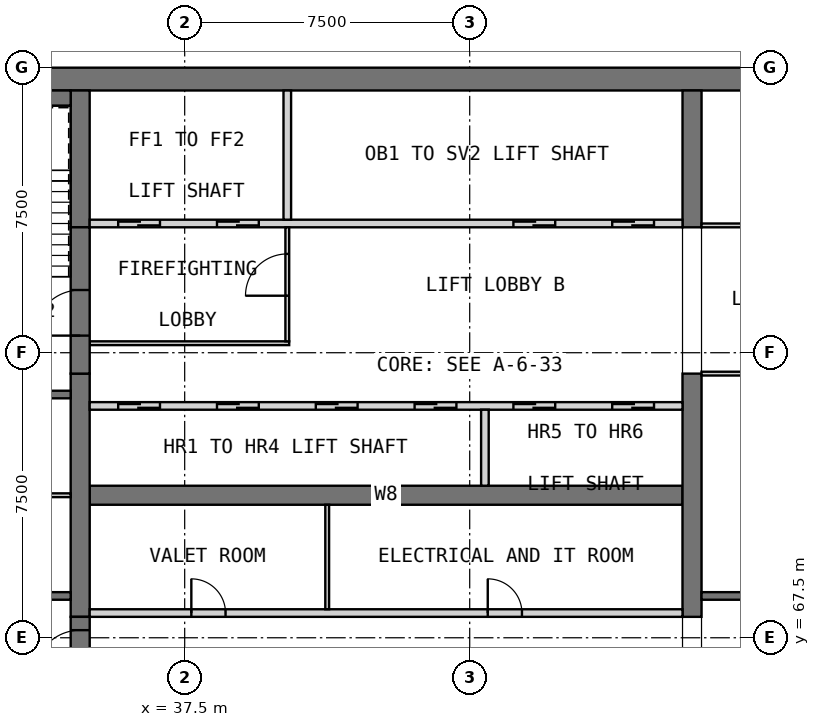
"""IFC4 building model, lengths in metres.
Left out: names, types, materials, properties, quantities, classifications, styles, units other than length and angle.
Written with IfcOpenShell. Run it as: python <this file> out.ifc"""

import sys

from ifc_helpers import new_model, si_unit, direction, frame, frame_2d, origin, place, context, subcontext, project, spatial, rectangle, extrude, element, fill, save


model = new_model("IFC4")
c1 = context("Model", 3, precision=1e-05, world=origin(), true_north=direction((0.0, 1.0)))
c2 = subcontext(c1, "Body", "Model", "MODEL_VIEW")
j1 = project(units=[si_unit("LENGTHUNIT", "METRE"), si_unit("PLANEANGLEUNIT", "RADIAN")], contexts=[c1])
p1 = place(None, origin())
s1 = spatial("IfcSite", under=j1, at=p1, CompositionType="ELEMENT")
p2 = place(p1, origin())
s2 = spatial("IfcBuilding", under=s1, at=p2, CompositionType="ELEMENT")
p3 = place(p2, frame((0.0, 0.0, 230.2)))
s3 = spatial("IfcBuildingStorey", under=s2, at=p3, CompositionType="ELEMENT", Elevation=230.2)
p4 = place(p3, frame((30.0, 82.2, 0.0), z_axis=(0.0, 0.0, 1.0), x_axis=(1.0, 0.0, 0.0)))
e1 = element("IfcWall", 1, at=p4, inside=s3, PredefinedType="SHEAR", context=c2, shape_type="SweptSolid", body=[
    extrude(rectangle(XDim=30.0, YDim=0.6, at=frame_2d((15.0, 0.0))), origin(), (0.0, 0.0, 1.0), 3.5),
])
p5 = place(p3, frame((35.0, 71.25, 0.0), z_axis=(0.0, 0.0, 1.0), x_axis=(1.0, 0.0, 0.0)))
e2 = element("IfcWall", 2, at=p5, inside=s3, PredefinedType="SHEAR", context=c2, shape_type="SweptSolid", body=[
    extrude(rectangle(XDim=15.6, YDim=0.5, at=frame_2d((7.8, 0.0))), origin(), (0.0, 0.0, 1.0), 3.5),
])
p6 = place(p3, frame((34.75, 68.05, 0.0), z_axis=(0.0, 0.0, 1.0), x_axis=(0.0, 1.0, 0.0)))
e3 = element("IfcWall", 3, at=p6, inside=s3, PredefinedType="SHEAR", context=c2, shape_type="SweptSolid", body=[
    extrude(rectangle(XDim=6.4, YDim=0.5, at=frame_2d((3.2, 0.0))), origin(), (0.0, 0.0, 1.0), 3.5),
])
p7 = place(p3, frame((34.75, 78.3, 0.0), z_axis=(0.0, 0.0, 1.0), x_axis=(0.0, 1.0, 0.0)))
e4 = element("IfcWall", 4, at=p7, inside=s3, PredefinedType="SHEAR", context=c2, shape_type="SweptSolid", body=[
    extrude(rectangle(XDim=3.6, YDim=0.5, at=frame_2d((1.8, 0.0))), origin(), (0.0, 0.0, 1.0), 3.5),
])
p8 = place(p3, frame((50.85, 68.05, 0.0), z_axis=(0.0, 0.0, 1.0), x_axis=(0.0, 1.0, 0.0)))
e5 = element("IfcWall", 5, at=p8, inside=s3, PredefinedType="SHEAR", context=c2, shape_type="SweptSolid", body=[
    extrude(rectangle(XDim=6.4, YDim=0.5, at=frame_2d((3.2, 0.0))), origin(), (0.0, 0.0, 1.0), 3.5),
])
p9 = place(p3, frame((50.85, 78.3, 0.0), z_axis=(0.0, 0.0, 1.0), x_axis=(0.0, 1.0, 0.0)))
e6 = element("IfcWall", 6, at=p9, inside=s3, PredefinedType="SHEAR", context=c2, shape_type="SweptSolid", body=[
    extrude(rectangle(XDim=3.6, YDim=0.5, at=frame_2d((1.8, 0.0))), origin(), (0.0, 0.0, 1.0), 3.5),
])
p10 = place(p3, frame((35.0, 68.15, 0.0), z_axis=(0.0, 0.0, 1.0), x_axis=(1.0, 0.0, 0.0)))
e7 = element("IfcWall", 7, at=p10, inside=s3, PredefinedType="PARTITIONING", context=c2, shape_type="SweptSolid", body=[
    extrude(rectangle(XDim=15.6, YDim=0.2, at=frame_2d((7.8, 0.0))), origin(), (0.0, 0.0, 1.0), 3.25),
])
p11 = place(p10, frame((2.675, 0.0, 0.0)))
e8 = element("IfcOpeningElement", 8, at=p11, cuts=e7, PredefinedType="OPENING", context=c2, shape_type="SweptSolid", body=[
    extrude(rectangle(XDim=0.9, YDim=2.1, at=frame_2d((0.45, 1.05))), frame((0.0, 0.11, 0.0), z_axis=(0.0, -1.0, 0.0), x_axis=(1.0, 0.0, 0.0)), (0.0, 0.0, 1.0), 0.22),
])
p12 = place(p10, frame((10.475, 0.0, 0.0)))
e9 = element("IfcOpeningElement", 9, at=p12, cuts=e7, PredefinedType="OPENING", context=c2, shape_type="SweptSolid", body=[
    extrude(rectangle(XDim=0.9, YDim=2.1, at=frame_2d((0.45, 1.05))), frame((0.0, 0.11, 0.0), z_axis=(0.0, -1.0, 0.0), x_axis=(1.0, 0.0, 0.0)), (0.0, 0.0, 1.0), 0.22),
])
p13 = place(p3, frame((41.25, 68.25, 0.0), z_axis=(0.0, 0.0, 1.0), x_axis=(0.0, 1.0, 0.0)))
e10 = element("IfcWall", 10, at=p13, inside=s3, PredefinedType="PARTITIONING", context=c2, shape_type="SweptSolid", body=[
    extrude(rectangle(XDim=2.75, YDim=0.1, at=frame_2d((1.375, 0.0))), origin(), (0.0, 0.0, 1.0), 3.25),
])
p14 = place(p3, frame((35.0, 73.6, 0.0), z_axis=(0.0, 0.0, 1.0), x_axis=(1.0, 0.0, 0.0)))
e11 = element("IfcWall", 11, at=p14, inside=s3, PredefinedType="SOLIDWALL", context=c2, shape_type="SweptSolid", body=[
    extrude(rectangle(XDim=15.6, YDim=0.2, at=frame_2d((7.8, 0.0))), origin(), (0.0, 0.0, 1.0), 3.5),
])
p15 = place(p14, frame((0.75, 0.0, 0.0)))
e12 = element("IfcOpeningElement", 12, at=p15, cuts=e11, PredefinedType="OPENING", context=c2, shape_type="SweptSolid", body=[
    extrude(rectangle(XDim=1.1, YDim=2.1, at=frame_2d((0.55, 1.05))), frame((0.0, 0.11, 0.0), z_axis=(0.0, -1.0, 0.0), x_axis=(1.0, 0.0, 0.0)), (0.0, 0.0, 1.0), 0.22),
])
p16 = place(p14, frame((3.35, 0.0, 0.0)))
e13 = element("IfcOpeningElement", 13, at=p16, cuts=e11, PredefinedType="OPENING", context=c2, shape_type="SweptSolid", body=[
    extrude(rectangle(XDim=1.1, YDim=2.1, at=frame_2d((0.55, 1.05))), frame((0.0, 0.11, 0.0), z_axis=(0.0, -1.0, 0.0), x_axis=(1.0, 0.0, 0.0)), (0.0, 0.0, 1.0), 0.22),
])
p17 = place(p14, frame((5.95, 0.0, 0.0)))
e14 = element("IfcOpeningElement", 14, at=p17, cuts=e11, PredefinedType="OPENING", context=c2, shape_type="SweptSolid", body=[
    extrude(rectangle(XDim=1.1, YDim=2.1, at=frame_2d((0.55, 1.05))), frame((0.0, 0.11, 0.0), z_axis=(0.0, -1.0, 0.0), x_axis=(1.0, 0.0, 0.0)), (0.0, 0.0, 1.0), 0.22),
])
p18 = place(p14, frame((8.55, 0.0, 0.0)))
e15 = element("IfcOpeningElement", 15, at=p18, cuts=e11, PredefinedType="OPENING", context=c2, shape_type="SweptSolid", body=[
    extrude(rectangle(XDim=1.1, YDim=2.1, at=frame_2d((0.55, 1.05))), frame((0.0, 0.11, 0.0), z_axis=(0.0, -1.0, 0.0), x_axis=(1.0, 0.0, 0.0)), (0.0, 0.0, 1.0), 0.22),
])
p19 = place(p14, frame((11.15, 0.0, 0.0)))
e16 = element("IfcOpeningElement", 16, at=p19, cuts=e11, PredefinedType="OPENING", context=c2, shape_type="SweptSolid", body=[
    extrude(rectangle(XDim=1.1, YDim=2.1, at=frame_2d((0.55, 1.05))), frame((0.0, 0.11, 0.0), z_axis=(0.0, -1.0, 0.0), x_axis=(1.0, 0.0, 0.0)), (0.0, 0.0, 1.0), 0.22),
])
p20 = place(p14, frame((13.75, 0.0, 0.0)))
e17 = element("IfcOpeningElement", 17, at=p20, cuts=e11, PredefinedType="OPENING", context=c2, shape_type="SweptSolid", body=[
    extrude(rectangle(XDim=1.1, YDim=2.1, at=frame_2d((0.55, 1.05))), frame((0.0, 0.11, 0.0), z_axis=(0.0, -1.0, 0.0), x_axis=(1.0, 0.0, 0.0)), (0.0, 0.0, 1.0), 0.22),
])
p21 = place(p3, frame((45.4, 71.5, 0.0), z_axis=(0.0, 0.0, 1.0), x_axis=(0.0, 1.0, 0.0)))
e18 = element("IfcWall", 18, at=p21, inside=s3, PredefinedType="SOLIDWALL", context=c2, shape_type="SweptSolid", body=[
    extrude(rectangle(XDim=2.0, YDim=0.2, at=frame_2d((1.0, 0.0))), origin(), (0.0, 0.0, 1.0), 3.5),
])
p22 = place(p3, frame((35.0, 78.4, 0.0), z_axis=(0.0, 0.0, 1.0), x_axis=(1.0, 0.0, 0.0)))
e19 = element("IfcWall", 19, at=p22, inside=s3, PredefinedType="SOLIDWALL", context=c2, shape_type="SweptSolid", body=[
    extrude(rectangle(XDim=15.6, YDim=0.2, at=frame_2d((7.8, 0.0))), origin(), (0.0, 0.0, 1.0), 3.5),
])
p23 = place(p22, frame((0.75, 0.0, 0.0)))
e20 = element("IfcOpeningElement", 20, at=p23, cuts=e19, PredefinedType="OPENING", context=c2, shape_type="SweptSolid", body=[
    extrude(rectangle(XDim=1.1, YDim=2.1, at=frame_2d((0.55, 1.05))), frame((0.0, 0.11, 0.0), z_axis=(0.0, -1.0, 0.0), x_axis=(1.0, 0.0, 0.0)), (0.0, 0.0, 1.0), 0.22),
])
p24 = place(p22, frame((3.35, 0.0, 0.0)))
e21 = element("IfcOpeningElement", 21, at=p24, cuts=e19, PredefinedType="OPENING", context=c2, shape_type="SweptSolid", body=[
    extrude(rectangle(XDim=1.1, YDim=2.1, at=frame_2d((0.55, 1.05))), frame((0.0, 0.11, 0.0), z_axis=(0.0, -1.0, 0.0), x_axis=(1.0, 0.0, 0.0)), (0.0, 0.0, 1.0), 0.22),
])
p25 = place(p22, frame((11.15, 0.0, 0.0)))
e22 = element("IfcOpeningElement", 22, at=p25, cuts=e19, PredefinedType="OPENING", context=c2, shape_type="SweptSolid", body=[
    extrude(rectangle(XDim=1.1, YDim=2.1, at=frame_2d((0.55, 1.05))), frame((0.0, 0.11, 0.0), z_axis=(0.0, -1.0, 0.0), x_axis=(1.0, 0.0, 0.0)), (0.0, 0.0, 1.0), 0.22),
])
p26 = place(p22, frame((13.75, 0.0, 0.0)))
e23 = element("IfcOpeningElement", 23, at=p26, cuts=e19, PredefinedType="OPENING", context=c2, shape_type="SweptSolid", body=[
    extrude(rectangle(XDim=1.1, YDim=2.1, at=frame_2d((0.55, 1.05))), frame((0.0, 0.11, 0.0), z_axis=(0.0, -1.0, 0.0), x_axis=(1.0, 0.0, 0.0)), (0.0, 0.0, 1.0), 0.22),
])
p27 = place(p3, frame((40.2, 78.5, 0.0), z_axis=(0.0, 0.0, 1.0), x_axis=(0.0, 1.0, 0.0)))
e24 = element("IfcWall", 24, at=p27, inside=s3, PredefinedType="SOLIDWALL", context=c2, shape_type="SweptSolid", body=[
    extrude(rectangle(XDim=3.4, YDim=0.2, at=frame_2d((1.7, 0.0))), origin(), (0.0, 0.0, 1.0), 3.5),
])
p28 = place(p3, frame((35.0, 75.25, 0.0), z_axis=(0.0, 0.0, 1.0), x_axis=(1.0, 0.0, 0.0)))
e25 = element("IfcWall", 25, at=p28, inside=s3, PredefinedType="PARTITIONING", context=c2, shape_type="SweptSolid", body=[
    extrude(rectangle(XDim=5.25, YDim=0.1, at=frame_2d((2.625, 0.0))), origin(), (0.0, 0.0, 1.0), 3.25),
])
p29 = place(p3, frame((40.2, 75.3, 0.0), z_axis=(0.0, 0.0, 1.0), x_axis=(0.0, 1.0, 0.0)))
e26 = element("IfcWall", 26, at=p29, inside=s3, PredefinedType="PARTITIONING", context=c2, shape_type="SweptSolid", body=[
    extrude(rectangle(XDim=3.0, YDim=0.1, at=frame_2d((1.5, 0.0))), origin(), (0.0, 0.0, 1.0), 3.25),
])
p30 = place(p29, frame((1.2, 0.0, 0.0)))
e27 = element("IfcOpeningElement", 27, at=p30, cuts=e26, PredefinedType="OPENING", context=c2, shape_type="SweptSolid", body=[
    extrude(rectangle(XDim=1.1, YDim=2.1, at=frame_2d((0.55, 1.05))), frame((0.0, 0.06, 0.0), z_axis=(0.0, -1.0, 0.0), x_axis=(1.0, 0.0, 0.0)), (0.0, 0.0, 1.0), 0.12),
])
p31 = place(p3, frame((34.75, 64.2, 0.0), z_axis=(0.0, 0.0, 1.0), x_axis=(0.0, 1.0, 0.0)))
e28 = element("IfcWall", 28, at=p31, inside=s3, PredefinedType="SOLIDWALL", context=c2, shape_type="SweptSolid", body=[
    extrude(rectangle(XDim=3.85, YDim=0.5, at=frame_2d((1.925, 0.0))), origin(), (0.0, 0.0, 1.0), 2.3),
])
p32 = place(p31, frame((2.3, 0.0, 0.0)))
e29 = element("IfcOpeningElement", 29, at=p32, cuts=e28, PredefinedType="OPENING", context=c2, shape_type="SweptSolid", body=[
    extrude(rectangle(XDim=1.2, YDim=2.1, at=frame_2d((0.6, 1.05))), frame((0.0, 0.26, 0.0), z_axis=(0.0, -1.0, 0.0), x_axis=(1.0, 0.0, 0.0)), (0.0, 0.0, 1.0), 0.52),
])
p33 = place(p3, frame((34.75, 74.45, 0.0), z_axis=(0.0, 0.0, 1.0), x_axis=(0.0, 1.0, 0.0)))
e30 = element("IfcWall", 30, at=p33, inside=s3, PredefinedType="SOLIDWALL", context=c2, shape_type="SweptSolid", body=[
    extrude(rectangle(XDim=3.85, YDim=0.5, at=frame_2d((1.925, 0.0))), origin(), (0.0, 0.0, 1.0), 2.3),
])
p34 = place(p33, frame((1.0, 0.0, 0.0)))
e31 = element("IfcOpeningElement", 31, at=p34, cuts=e30, PredefinedType="OPENING", context=c2, shape_type="SweptSolid", body=[
    extrude(rectangle(XDim=1.2, YDim=2.1, at=frame_2d((0.6, 1.05))), frame((0.0, 0.26, 0.0), z_axis=(0.0, -1.0, 0.0), x_axis=(1.0, 0.0, 0.0)), (0.0, 0.0, 1.0), 0.52),
])
p35 = place(p3, frame((30.6, 68.6, 0.0), z_axis=(0.0, 0.0, 1.0), x_axis=(1.0, 0.0, 0.0)))
e32 = element("IfcWall", 32, at=p35, inside=s3, PredefinedType="SOLIDWALL", context=c2, shape_type="SweptSolid", body=[
    extrude(rectangle(XDim=3.9, YDim=0.2, at=frame_2d((1.95, 0.0))), origin(), (0.0, 0.0, 1.0), 3.25),
])
p36 = place(p35, frame((1.7, 0.0, 0.0)))
e33 = element("IfcOpeningElement", 33, at=p36, cuts=e32, PredefinedType="OPENING", context=c2, shape_type="SweptSolid", body=[
    extrude(rectangle(XDim=0.9, YDim=2.1, at=frame_2d((0.45, 1.05))), frame((0.0, 0.11, 0.0), z_axis=(0.0, -1.0, 0.0), x_axis=(1.0, 0.0, 0.0)), (0.0, 0.0, 1.0), 0.22),
])
p37 = place(p3, frame((30.6, 73.9, 0.0), z_axis=(0.0, 0.0, 1.0), x_axis=(1.0, 0.0, 0.0)))
e34 = element("IfcWall", 34, at=p37, inside=s3, PredefinedType="SOLIDWALL", context=c2, shape_type="SweptSolid", body=[
    extrude(rectangle(XDim=3.9, YDim=0.2, at=frame_2d((1.95, 0.0))), origin(), (0.0, 0.0, 1.0), 3.25),
])
p38 = place(p37, frame((1.7, 0.0, 0.0)))
e35 = element("IfcOpeningElement", 35, at=p38, cuts=e34, PredefinedType="OPENING", context=c2, shape_type="SweptSolid", body=[
    extrude(rectangle(XDim=0.9, YDim=2.1, at=frame_2d((0.45, 1.05))), frame((0.0, 0.11, 0.0), z_axis=(0.0, -1.0, 0.0), x_axis=(1.0, 0.0, 0.0)), (0.0, 0.0, 1.0), 0.22),
])
p39 = place(p3, frame((51.1, 68.6, 0.0), z_axis=(0.0, 0.0, 1.0), x_axis=(1.0, 0.0, 0.0)))
e36 = element("IfcWall", 36, at=p39, inside=s3, PredefinedType="SOLIDWALL", context=c2, shape_type="SweptSolid", body=[
    extrude(rectangle(XDim=8.3, YDim=0.2, at=frame_2d((4.15, 0.0))), origin(), (0.0, 0.0, 1.0), 3.25),
])
p40 = place(p3, frame((31.0, 81.7, 0.0), z_axis=(0.0, 0.0, 1.0), x_axis=(1.0, 0.0, 0.0)))
e37 = element("IfcWall", 37, at=p40, inside=s3, PredefinedType="SOLIDWALL", context=c2, shape_type="SweptSolid", body=[
    extrude(rectangle(XDim=3.5, YDim=0.4, at=frame_2d((1.75, 0.0))), origin(), (0.0, 0.0, 1.0), 3.25),
])
p41 = place(p3, frame((30.6, 71.25, 0.0), z_axis=(0.0, 0.0, 1.0), x_axis=(1.0, 0.0, 0.0)))
e38 = element("IfcWall", 38, at=p41, inside=s3, PredefinedType="PARTITIONING", context=c2, shape_type="SweptSolid", body=[
    extrude(rectangle(XDim=3.9, YDim=0.1, at=frame_2d((1.95, 0.0))), origin(), (0.0, 0.0, 1.0), 3.25),
])
p42 = place(p3, frame((51.1, 74.45, 0.0), z_axis=(0.0, 0.0, 1.0), x_axis=(1.0, 0.0, 0.0)))
e39 = element("IfcWall", 39, at=p42, inside=s3, PredefinedType="PARTITIONING", context=c2, shape_type="SweptSolid", body=[
    extrude(rectangle(XDim=8.3, YDim=0.1, at=frame_2d((4.15, 0.0))), origin(), (0.0, 0.0, 1.0), 3.25),
])
p43 = place(p42, frame((3.7, 0.0, 0.0)))
e40 = element("IfcOpeningElement", 40, at=p43, cuts=e39, PredefinedType="OPENING", context=c2, shape_type="SweptSolid", body=[
    extrude(rectangle(XDim=0.9, YDim=2.1, at=frame_2d((0.45, 1.05))), frame((0.0, 0.06, 0.0), z_axis=(0.0, -1.0, 0.0), x_axis=(1.0, 0.0, 0.0)), (0.0, 0.0, 1.0), 0.12),
])
p44 = place(p3, frame((51.1, 78.35, 0.0), z_axis=(0.0, 0.0, 1.0), x_axis=(1.0, 0.0, 0.0)))
e41 = element("IfcWall", 41, at=p44, inside=s3, PredefinedType="PARTITIONING", context=c2, shape_type="SweptSolid", body=[
    extrude(rectangle(XDim=8.3, YDim=0.1, at=frame_2d((4.15, 0.0))), origin(), (0.0, 0.0, 1.0), 3.25),
])
p45 = place(p44, frame((3.7, 0.0, 0.0)))
e42 = element("IfcOpeningElement", 42, at=p45, cuts=e41, PredefinedType="OPENING", context=c2, shape_type="SweptSolid", body=[
    extrude(rectangle(XDim=0.9, YDim=2.1, at=frame_2d((0.45, 1.05))), frame((0.0, 0.06, 0.0), z_axis=(0.0, -1.0, 0.0), x_axis=(1.0, 0.0, 0.0)), (0.0, 0.0, 1.0), 0.12),
])
p46 = place(p11, origin())
e43 = element("IfcDoor", 43, at=p46, inside=s3, OperationType="SINGLE_SWING_LEFT", PredefinedType="DOOR", context=c2, shape_type="SweptSolid", body=[
    extrude(rectangle(XDim=0.9, YDim=2.1, at=frame_2d((0.45, 1.05))), frame((0.0, 0.025, 0.0), z_axis=(0.0, -1.0, 0.0), x_axis=(1.0, 0.0, 0.0)), (0.0, 0.0, 1.0), 0.05),
])
fill(e8, e43)
p47 = place(p12, origin())
e44 = element("IfcDoor", 44, at=p47, inside=s3, OperationType="SINGLE_SWING_RIGHT", PredefinedType="DOOR", context=c2, shape_type="SweptSolid", body=[
    extrude(rectangle(XDim=0.9, YDim=2.1, at=frame_2d((0.45, 1.05))), frame((0.0, 0.025, 0.0), z_axis=(0.0, -1.0, 0.0), x_axis=(1.0, 0.0, 0.0)), (0.0, 0.0, 1.0), 0.05),
])
fill(e9, e44)
p48 = place(p15, origin())
e45 = element("IfcDoor", 45, at=p48, inside=s3, OperationType="DOUBLE_DOOR_SLIDING", PredefinedType="DOOR", context=c2, shape_type="SweptSolid", body=[
    extrude(rectangle(XDim=1.1, YDim=2.1, at=frame_2d((0.55, 1.05))), frame((0.0, 0.025, 0.0), z_axis=(0.0, -1.0, 0.0), x_axis=(1.0, 0.0, 0.0)), (0.0, 0.0, 1.0), 0.05),
])
fill(e12, e45)
p49 = place(p16, origin())
e46 = element("IfcDoor", 46, at=p49, inside=s3, OperationType="DOUBLE_DOOR_SLIDING", PredefinedType="DOOR", context=c2, shape_type="SweptSolid", body=[
    extrude(rectangle(XDim=1.1, YDim=2.1, at=frame_2d((0.55, 1.05))), frame((0.0, 0.025, 0.0), z_axis=(0.0, -1.0, 0.0), x_axis=(1.0, 0.0, 0.0)), (0.0, 0.0, 1.0), 0.05),
])
fill(e13, e46)
p50 = place(p17, origin())
e47 = element("IfcDoor", 47, at=p50, inside=s3, OperationType="DOUBLE_DOOR_SLIDING", PredefinedType="DOOR", context=c2, shape_type="SweptSolid", body=[
    extrude(rectangle(XDim=1.1, YDim=2.1, at=frame_2d((0.55, 1.05))), frame((0.0, 0.025, 0.0), z_axis=(0.0, -1.0, 0.0), x_axis=(1.0, 0.0, 0.0)), (0.0, 0.0, 1.0), 0.05),
])
fill(e14, e47)
p51 = place(p18, origin())
e48 = element("IfcDoor", 48, at=p51, inside=s3, OperationType="DOUBLE_DOOR_SLIDING", PredefinedType="DOOR", context=c2, shape_type="SweptSolid", body=[
    extrude(rectangle(XDim=1.1, YDim=2.1, at=frame_2d((0.55, 1.05))), frame((0.0, 0.025, 0.0), z_axis=(0.0, -1.0, 0.0), x_axis=(1.0, 0.0, 0.0)), (0.0, 0.0, 1.0), 0.05),
])
fill(e15, e48)
p52 = place(p19, origin())
e49 = element("IfcDoor", 49, at=p52, inside=s3, OperationType="DOUBLE_DOOR_SLIDING", PredefinedType="DOOR", context=c2, shape_type="SweptSolid", body=[
    extrude(rectangle(XDim=1.1, YDim=2.1, at=frame_2d((0.55, 1.05))), frame((0.0, 0.025, 0.0), z_axis=(0.0, -1.0, 0.0), x_axis=(1.0, 0.0, 0.0)), (0.0, 0.0, 1.0), 0.05),
])
fill(e16, e49)
p53 = place(p20, origin())
e50 = element("IfcDoor", 50, at=p53, inside=s3, OperationType="DOUBLE_DOOR_SLIDING", PredefinedType="DOOR", context=c2, shape_type="SweptSolid", body=[
    extrude(rectangle(XDim=1.1, YDim=2.1, at=frame_2d((0.55, 1.05))), frame((0.0, 0.025, 0.0), z_axis=(0.0, -1.0, 0.0), x_axis=(1.0, 0.0, 0.0)), (0.0, 0.0, 1.0), 0.05),
])
fill(e17, e50)
p54 = place(p23, origin())
e51 = element("IfcDoor", 51, at=p54, inside=s3, OperationType="DOUBLE_DOOR_SLIDING", PredefinedType="DOOR", context=c2, shape_type="SweptSolid", body=[
    extrude(rectangle(XDim=1.1, YDim=2.1, at=frame_2d((0.55, 1.05))), frame((0.0, 0.025, 0.0), z_axis=(0.0, -1.0, 0.0), x_axis=(1.0, 0.0, 0.0)), (0.0, 0.0, 1.0), 0.05),
])
fill(e20, e51)
p55 = place(p24, origin())
e52 = element("IfcDoor", 52, at=p55, inside=s3, OperationType="DOUBLE_DOOR_SLIDING", PredefinedType="DOOR", context=c2, shape_type="SweptSolid", body=[
    extrude(rectangle(XDim=1.1, YDim=2.1, at=frame_2d((0.55, 1.05))), frame((0.0, 0.025, 0.0), z_axis=(0.0, -1.0, 0.0), x_axis=(1.0, 0.0, 0.0)), (0.0, 0.0, 1.0), 0.05),
])
fill(e21, e52)
p56 = place(p25, origin())
e53 = element("IfcDoor", 53, at=p56, inside=s3, OperationType="DOUBLE_DOOR_SLIDING", PredefinedType="DOOR", context=c2, shape_type="SweptSolid", body=[
    extrude(rectangle(XDim=1.1, YDim=2.1, at=frame_2d((0.55, 1.05))), frame((0.0, 0.025, 0.0), z_axis=(0.0, -1.0, 0.0), x_axis=(1.0, 0.0, 0.0)), (0.0, 0.0, 1.0), 0.05),
])
fill(e22, e53)
p57 = place(p26, origin())
e54 = element("IfcDoor", 54, at=p57, inside=s3, OperationType="DOUBLE_DOOR_SLIDING", PredefinedType="DOOR", context=c2, shape_type="SweptSolid", body=[
    extrude(rectangle(XDim=1.1, YDim=2.1, at=frame_2d((0.55, 1.05))), frame((0.0, 0.025, 0.0), z_axis=(0.0, -1.0, 0.0), x_axis=(1.0, 0.0, 0.0)), (0.0, 0.0, 1.0), 0.05),
])
fill(e23, e54)
p58 = place(p30, origin())
e55 = element("IfcDoor", 55, at=p58, inside=s3, OperationType="SINGLE_SWING_LEFT", PredefinedType="DOOR", context=c2, shape_type="SweptSolid", body=[
    extrude(rectangle(XDim=1.1, YDim=2.1, at=frame_2d((0.55, 1.05))), frame((0.0, 0.025, 0.0), z_axis=(0.0, -1.0, 0.0), x_axis=(1.0, 0.0, 0.0)), (0.0, 0.0, 1.0), 0.05),
])
fill(e27, e55)
p59 = place(p32, origin())
e56 = element("IfcDoor", 56, at=p59, inside=s3, OperationType="SINGLE_SWING_LEFT", PredefinedType="DOOR", context=c2, shape_type="SweptSolid", body=[
    extrude(rectangle(XDim=1.2, YDim=2.1, at=frame_2d((0.6, 1.05))), frame((0.0, 0.025, 0.0), z_axis=(0.0, -1.0, 0.0), x_axis=(1.0, 0.0, 0.0)), (0.0, 0.0, 1.0), 0.05),
])
fill(e29, e56)
p60 = place(p34, origin())
e57 = element("IfcDoor", 57, at=p60, inside=s3, OperationType="SINGLE_SWING_RIGHT", PredefinedType="DOOR", context=c2, shape_type="SweptSolid", body=[
    extrude(rectangle(XDim=1.2, YDim=2.1, at=frame_2d((0.6, 1.05))), frame((0.0, 0.025, 0.0), z_axis=(0.0, -1.0, 0.0), x_axis=(1.0, 0.0, 0.0)), (0.0, 0.0, 1.0), 0.05),
])
fill(e31, e57)
save(model, sys.argv[1])
